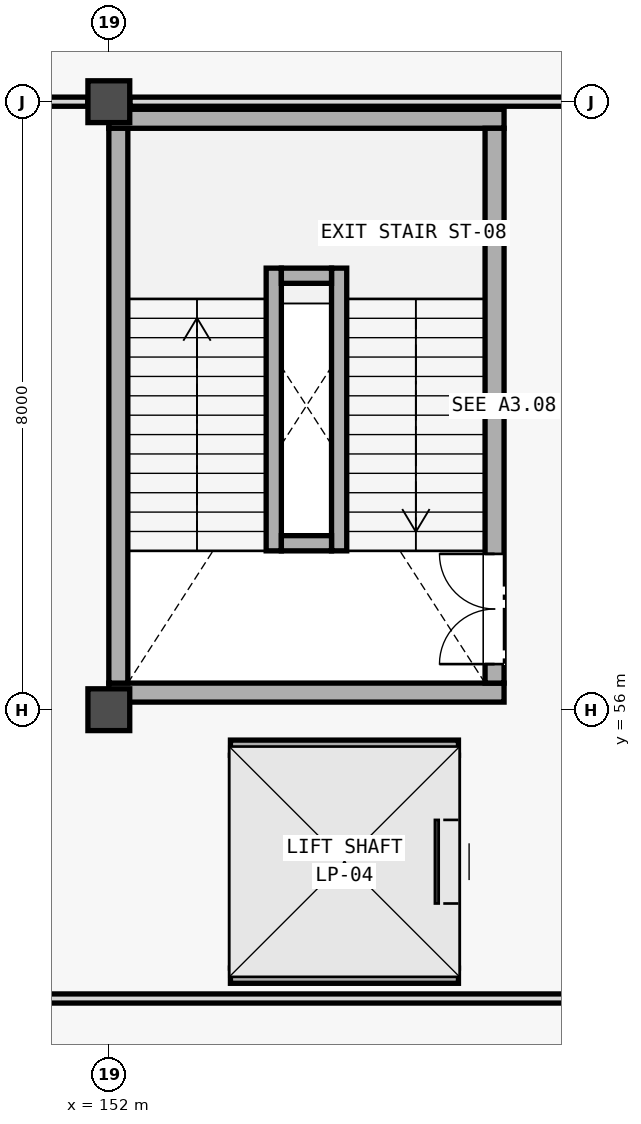
"""IFC4 building model, lengths in metres.
Left out: names, types, materials, properties, quantities, classifications, styles, units other than length and angle.
Written with IfcOpenShell. Run it as: python <this file> out.ifc"""

import sys

from ifc_helpers import new_model, si_unit, direction, frame, frame_2d, origin, origin_2d, place, context, subcontext, project, spatial, rectangle, extrude, element, fill, save


model = new_model("IFC4")
c1 = context("Model", 3, precision=1e-05, world=origin(), true_north=direction((0.0, 1.0)))
c2 = subcontext(c1, "Body", "Model", "MODEL_VIEW")
j1 = project(units=[si_unit("LENGTHUNIT", "METRE"), si_unit("PLANEANGLEUNIT", "RADIAN")], contexts=[c1])
p1 = place(None, origin())
s1 = spatial("IfcSite", under=j1, at=p1, CompositionType="ELEMENT")
p2 = place(p1, origin())
s2 = spatial("IfcBuilding", under=s1, at=p2, CompositionType="ELEMENT")
p3 = place(p2, frame((0.0, 0.0, 14.4)))
s3 = spatial("IfcBuildingStorey", under=s2, at=p3, CompositionType="ELEMENT", Elevation=14.4)
for number, where, z_axis, x_axis in (
    (1, (152.0, 56.0, 0.0), (0.0, 0.0, 1.0), (1.0, 0.0, 0.0)),
    (2, (152.0, 64.0, 0.0), (0.0, 0.0, 1.0), (1.0, 0.0, 0.0)),
):
    element("IfcColumn", number, at=place(p3, frame(where, z_axis=z_axis, x_axis=x_axis)), inside=s3, PredefinedType="COLUMN", context=c2, shape_type="SweptSolid", body=[
        extrude(rectangle(XDim=0.55, YDim=0.55, at=origin_2d()), origin(), (0.0, 0.0, 1.0), 3.975),
    ])
for number, where, z_axis, x_axis in (
    (3, (152.0, 56.225, 0.0), (0.0, 0.0, 1.0), (1.0, 0.0, 0.0)),
    (4, (152.0, 63.775, 0.0), (0.0, 0.0, 1.0), (1.0, 0.0, 0.0)),
):
    element("IfcWall", number, at=place(p3, frame(where, z_axis=z_axis, x_axis=x_axis)), inside=s3, PredefinedType="SHEAR", context=c2, shape_type="SweptSolid", body=[
        extrude(rectangle(XDim=5.2, YDim=0.25, at=frame_2d((2.6, 0.0))), origin(), (0.0, 0.0, 1.0), 4.2),
    ])
p4 = place(p3, frame((152.125, 56.35, 0.0), z_axis=(0.0, 0.0, 1.0), x_axis=(0.0, 1.0, 0.0)))
e5 = element("IfcWall", 5, at=p4, inside=s3, PredefinedType="SHEAR", context=c2, shape_type="SweptSolid", body=[
    extrude(rectangle(XDim=7.3, YDim=0.25, at=frame_2d((3.65, 0.0))), origin(), (0.0, 0.0, 1.0), 4.2),
])
p5 = place(p3, frame((157.075, 56.35, 0.0), z_axis=(0.0, 0.0, 1.0), x_axis=(0.0, 1.0, 0.0)))
e6 = element("IfcWall", 6, at=p5, inside=s3, PredefinedType="SHEAR", context=c2, shape_type="SweptSolid", body=[
    extrude(rectangle(XDim=7.3, YDim=0.25, at=frame_2d((3.65, 0.0))), origin(), (0.0, 0.0, 1.0), 4.2),
])
p6 = place(p5, frame((0.25, 0.0, 0.0)))
e7 = element("IfcOpeningElement", 7, at=p6, cuts=e6, PredefinedType="OPENING", context=c2, shape_type="SweptSolid", body=[
    extrude(rectangle(XDim=1.45, YDim=2.2, at=frame_2d((0.725, 1.1))), frame((0.0, 0.135, 0.0), z_axis=(0.0, -1.0, 0.0), x_axis=(1.0, 0.0, 0.0)), (0.0, 0.0, 1.0), 0.27),
])
for number, where, z_axis, x_axis in (
    (8, (154.17, 58.09, 0.0), (0.0, 0.0, 1.0), (0.0, 1.0, 0.0)),
    (9, (155.03, 58.09, 0.0), (0.0, 0.0, 1.0), (0.0, 1.0, 0.0)),
):
    element("IfcWall", number, at=place(p3, frame(where, z_axis=z_axis, x_axis=x_axis)), inside=s3, PredefinedType="SHEAR", context=c2, shape_type="SweptSolid", body=[
        extrude(rectangle(XDim=3.72, YDim=0.2, at=frame_2d((1.86, 0.0))), origin(), (0.0, 0.0, 1.0), 4.2),
    ])
for number, where, z_axis, x_axis in (
    (10, (154.27, 58.19, 0.0), (0.0, 0.0, 1.0), (1.0, 0.0, 0.0)),
    (11, (154.27, 61.71, 0.0), (0.0, 0.0, 1.0), (1.0, 0.0, 0.0)),
):
    element("IfcWall", number, at=place(p3, frame(where, z_axis=z_axis, x_axis=x_axis)), inside=s3, PredefinedType="SHEAR", context=c2, shape_type="SweptSolid", body=[
        extrude(rectangle(XDim=0.66, YDim=0.2, at=frame_2d((0.33, 0.0))), origin(), (0.0, 0.0, 1.0), 4.2),
    ])
for number, where, z_axis, x_axis in (
    (12, (153.6, 52.5, 0.0), (0.0, 0.0, 1.0), (1.0, 0.0, 0.0)),
    (13, (153.6, 55.5, 0.0), (0.0, 0.0, 1.0), (1.0, 0.0, 0.0)),
):
    element("IfcWall", number, at=place(p3, frame(where, z_axis=z_axis, x_axis=x_axis)), inside=s3, PredefinedType="SHEAR", context=c2, shape_type="SweptSolid", body=[
        extrude(rectangle(XDim=3.0, YDim=0.2, at=frame_2d((1.5, 0.0))), origin(), (0.0, 0.0, 1.0), 4.2),
    ])
p7 = place(p3, frame((153.7, 52.6, 0.0), z_axis=(0.0, 0.0, 1.0), x_axis=(0.0, 1.0, 0.0)))
e14 = element("IfcWall", 14, at=p7, inside=s3, PredefinedType="SHEAR", context=c2, shape_type="SweptSolid", body=[
    extrude(rectangle(XDim=2.8, YDim=0.2, at=frame_2d((1.4, 0.0))), origin(), (0.0, 0.0, 1.0), 4.2),
])
p8 = place(p3, frame((156.5, 52.6, 0.0), z_axis=(0.0, 0.0, 1.0), x_axis=(0.0, 1.0, 0.0)))
e15 = element("IfcWall", 15, at=p8, inside=s3, PredefinedType="SHEAR", context=c2, shape_type="SweptSolid", body=[
    extrude(rectangle(XDim=2.8, YDim=0.2, at=frame_2d((1.4, 0.0))), origin(), (0.0, 0.0, 1.0), 4.2),
])
p9 = place(p8, frame((0.85, 0.0, 0.0)))
e16 = element("IfcOpeningElement", 16, at=p9, cuts=e15, PredefinedType="OPENING", context=c2, shape_type="SweptSolid", body=[
    extrude(rectangle(XDim=1.1, YDim=2.2, at=frame_2d((0.55, 1.1))), frame((0.0, 0.11, 0.0), z_axis=(0.0, -1.0, 0.0), x_axis=(1.0, 0.0, 0.0)), (0.0, 0.0, 1.0), 0.22),
])
p10 = place(p3, frame((144.15, 52.2, 0.0), z_axis=(0.0, 0.0, 1.0), x_axis=(1.0, 0.0, 0.0)))
e17 = element("IfcWall", 17, at=p10, inside=s3, PredefinedType="PARTITIONING", context=c2, shape_type="SweptSolid", body=[
    extrude(rectangle(XDim=17.85, YDim=0.12, at=frame_2d((8.925, 0.0))), origin(), (0.0, 0.0, 1.0), 3.255),
])
p11 = place(p3, frame((144.277, 64.0, 0.0), z_axis=(0.0, 0.0, 1.0), x_axis=(1.0, 0.0, 0.0)))
e18 = element("IfcWall", 18, at=p11, inside=s3, PredefinedType="PARTITIONING", context=c2, shape_type="SweptSolid", body=[
    extrude(rectangle(XDim=7.446, YDim=0.12, at=frame_2d((3.723, 0.0))), origin(), (0.0, 0.0, 1.0), 3.355),
])
p12 = place(p3, frame((152.277, 64.0, 0.0), z_axis=(0.0, 0.0, 1.0), x_axis=(1.0, 0.0, 0.0)))
e19 = element("IfcWall", 19, at=p12, inside=s3, PredefinedType="PARTITIONING", context=c2, shape_type="SweptSolid", body=[
    extrude(rectangle(XDim=9.446, YDim=0.12, at=frame_2d((4.723, 0.0))), origin(), (0.0, 0.0, 1.0), 3.355),
])
p13 = place(p6, origin())
e20 = element("IfcDoor", 20, at=p13, inside=s3, OperationType="DOUBLE_DOOR_SINGLE_SWING", PredefinedType="DOOR", context=c2, shape_type="SweptSolid", body=[
    extrude(rectangle(XDim=1.45, YDim=2.2, at=frame_2d((0.725, 1.1))), frame((0.0, 0.025, 0.0), z_axis=(0.0, -1.0, 0.0), x_axis=(1.0, 0.0, 0.0)), (0.0, 0.0, 1.0), 0.05),
])
fill(e7, e20)
p14 = place(p9, origin())
e21 = element("IfcDoor", 21, at=p14, inside=s3, OperationType="SLIDING_TO_LEFT", PredefinedType="DOOR", context=c2, shape_type="SweptSolid", body=[
    extrude(rectangle(XDim=1.1, YDim=2.2, at=frame_2d((0.55, 1.1))), frame((0.0, 0.025, 0.0), z_axis=(0.0, -1.0, 0.0), x_axis=(1.0, 0.0, 0.0)), (0.0, 0.0, 1.0), 0.05),
])
fill(e16, e21)
save(model, sys.argv[1])
